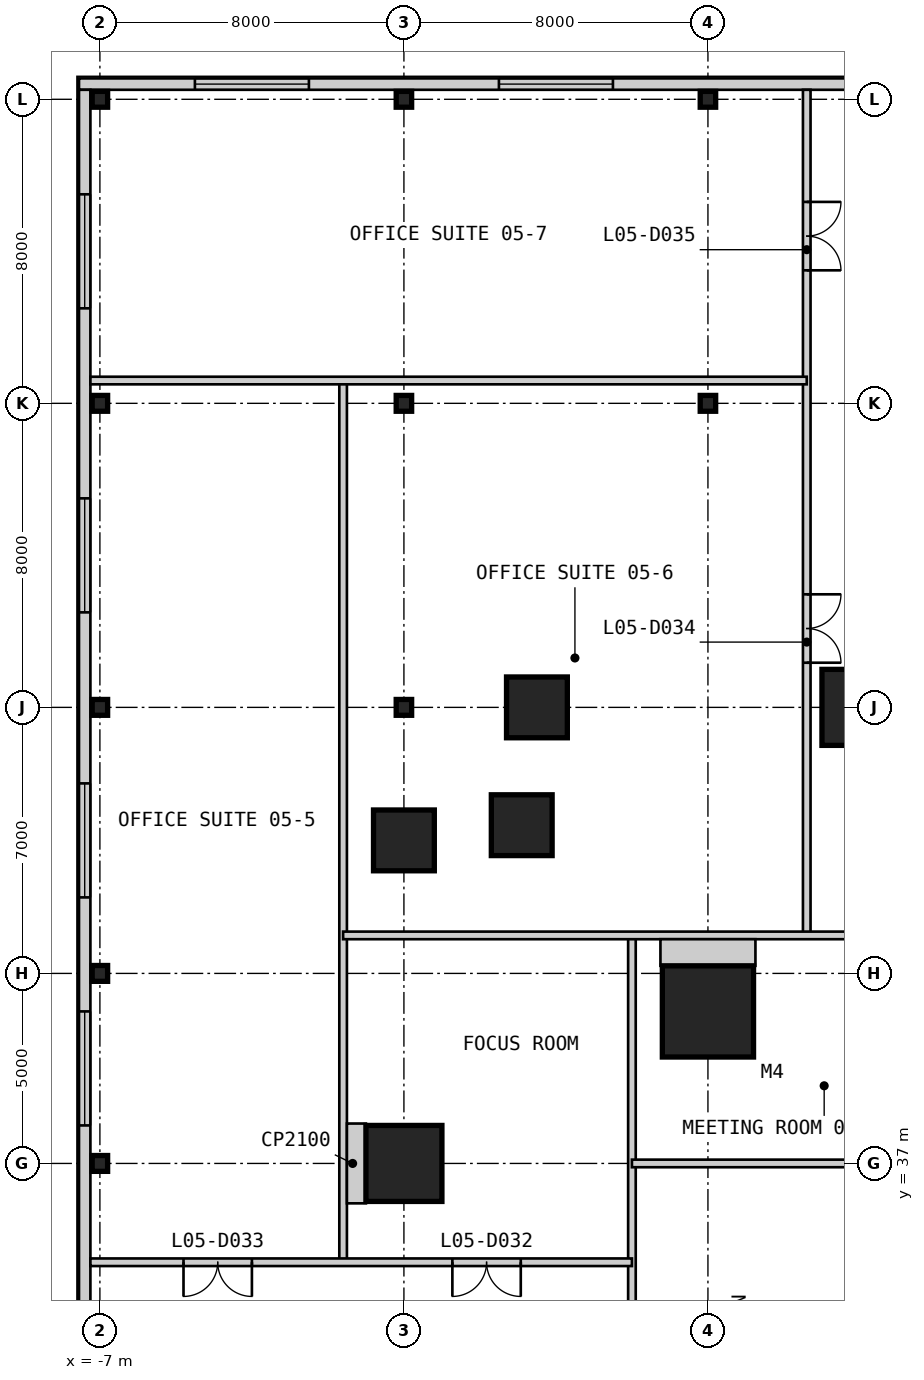
"""IFC4 building model, lengths in metres.
Left out: names, types, materials, properties, quantities, classifications, styles, units other than length and angle.
Written with IfcOpenShell. Run it as: python <this file> out.ifc"""

import sys

from ifc_helpers import new_model, si_unit, direction, frame, frame_2d, origin, origin_2d, place, context, subcontext, project, spatial, rectangle, i_section, extrude, element, fill, save


model = new_model("IFC4")
c1 = context("Model", 3, precision=1e-05, world=origin(), true_north=direction((0.0, 1.0)))
c2 = subcontext(c1, "Body", "Model", "MODEL_VIEW")
j1 = project(units=[si_unit("LENGTHUNIT", "METRE"), si_unit("PLANEANGLEUNIT", "RADIAN")], contexts=[c1])
p1 = place(None, origin())
s1 = spatial("IfcSite", under=j1, at=p1, CompositionType="ELEMENT")
p2 = place(p1, origin())
s2 = spatial("IfcBuilding", under=s1, at=p2, CompositionType="ELEMENT")
p3 = place(p2, frame((0.0, 0.0, 26.2)))
s3 = spatial("IfcBuildingStorey", under=s2, at=p3, CompositionType="ELEMENT", Elevation=26.2)
p4 = place(p3, frame((9.0, 41.0, 0.0), z_axis=(0.0, 0.0, 1.0), x_axis=(1.0, 0.0, 0.0)))
e1 = element("IfcColumn", 1, at=p4, inside=s3, PredefinedType="COLUMN", context=c2, shape_type="SweptSolid", body=[
    extrude(rectangle(XDim=2.4, YDim=2.4, at=origin_2d()), origin(), (0.0, 0.0, 1.0), 4.8),
])
p5 = place(p3, frame((13.0, 49.0, 0.0), z_axis=(0.0, 0.0, 1.0), x_axis=(1.0, 0.0, 0.0)))
e2 = element("IfcColumn", 2, at=p5, inside=s3, PredefinedType="COLUMN", context=c2, shape_type="SweptSolid", body=[
    extrude(rectangle(XDim=2.0, YDim=2.0, at=origin_2d()), origin(), (0.0, 0.0, 1.0), 4.8),
])
for number, where, z_axis, x_axis in (
    (3, (4.5, 49.0, 0.0), (0.0, 0.0, 1.0), (1.0, 0.0, 0.0)),
    (4, (4.1, 45.9, 0.0), (0.0, 0.0, 1.0), (1.0, 0.0, 0.0)),
    (5, (1.0, 45.5, 0.0), (0.0, 0.0, 1.0), (1.0, 0.0, 0.0)),
):
    element("IfcColumn", number, at=place(p3, frame(where, z_axis=z_axis, x_axis=x_axis)), inside=s3, PredefinedType="COLUMN", context=c2, shape_type="SweptSolid", body=[
        extrude(rectangle(XDim=1.6, YDim=1.6, at=origin_2d()), origin(), (0.0, 0.0, 1.0), 4.8),
    ])
p6 = place(p3, frame((1.0, 37.0, 0.0), z_axis=(0.0, 0.0, 1.0), x_axis=(1.0, 0.0, 0.0)))
e6 = element("IfcColumn", 6, at=p6, inside=s3, PredefinedType="COLUMN", context=c2, shape_type="SweptSolid", body=[
    extrude(rectangle(XDim=2.0, YDim=2.0, at=origin_2d()), origin(), (0.0, 0.0, 1.0), 4.8),
])
for number, where, z_axis, x_axis in (
    (7, (-7.0, 37.0, 0.0), (0.0, 0.0, 1.0), (1.0, 0.0, 0.0)),
    (8, (-7.0, 42.0, 0.0), (0.0, 0.0, 1.0), (1.0, 0.0, 0.0)),
    (9, (-7.0, 49.0, 0.0), (0.0, 0.0, 1.0), (1.0, 0.0, 0.0)),
    (10, (-7.0, 57.0, 0.0), (0.0, 0.0, 1.0), (1.0, 0.0, 0.0)),
    (11, (-7.0, 65.0, 0.0), (0.0, 0.0, 1.0), (1.0, 0.0, 0.0)),
    (12, (1.0, 49.0, 0.0), (0.0, 0.0, 1.0), (1.0, 0.0, 0.0)),
    (13, (1.0, 57.0, 0.0), (0.0, 0.0, 1.0), (1.0, 0.0, 0.0)),
    (14, (1.0, 65.0, 0.0), (0.0, 0.0, 1.0), (1.0, 0.0, 0.0)),
    (15, (9.0, 57.0, 0.0), (0.0, 0.0, 1.0), (1.0, 0.0, 0.0)),
    (16, (9.0, 65.0, 0.0), (0.0, 0.0, 1.0), (1.0, 0.0, 0.0)),
):
    element("IfcColumn", number, at=place(p3, frame(where, z_axis=z_axis, x_axis=x_axis)), inside=s3, PredefinedType="COLUMN", context=c2, shape_type="SweptSolid", body=[
        extrude(i_section(OverallWidth=0.406, OverallDepth=0.417, WebThickness=0.03, FlangeThickness=0.048, at=origin_2d()), origin(), (0.0, 0.0, 1.0), 4.8),
    ])
p7 = place(p3, frame((57.55, 65.4, 0.0), z_axis=(0.0, 0.0, 1.0), x_axis=(-1.0, 0.0, 0.0)))
e17 = element("IfcWall", 17, at=p7, inside=s3, PredefinedType="SOLIDWALL", context=c2, shape_type="SweptSolid", body=[
    extrude(rectangle(XDim=65.1, YDim=0.3, at=frame_2d((32.55, 0.0))), origin(), (0.0, 0.0, 1.0), 4.5),
])
p8 = place(p7, frame((59.05, 0.0, 0.9)))
e18 = element("IfcOpeningElement", 18, at=p8, cuts=e17, PredefinedType="OPENING", context=c2, shape_type="SweptSolid", body=[
    extrude(rectangle(XDim=3.0, YDim=2.4, at=frame_2d((1.5, 1.2))), frame((0.0, 0.16, 0.0), z_axis=(0.0, -1.0, 0.0), x_axis=(1.0, 0.0, 0.0)), (0.0, 0.0, 1.0), 0.32),
])
p9 = place(p7, frame((51.05, 0.0, 0.9)))
e19 = element("IfcOpeningElement", 19, at=p9, cuts=e17, PredefinedType="OPENING", context=c2, shape_type="SweptSolid", body=[
    extrude(rectangle(XDim=3.0, YDim=2.4, at=frame_2d((1.5, 1.2))), frame((0.0, 0.16, 0.0), z_axis=(0.0, -1.0, 0.0), x_axis=(1.0, 0.0, 0.0)), (0.0, 0.0, 1.0), 0.32),
])
p10 = place(p7, frame((37.05, 0.0, 0.9)))
e20 = element("IfcOpeningElement", 20, at=p10, cuts=e17, PredefinedType="OPENING", context=c2, shape_type="SweptSolid", body=[
    extrude(rectangle(XDim=3.0, YDim=2.4, at=frame_2d((1.5, 1.2))), frame((0.0, 0.16, 0.0), z_axis=(0.0, -1.0, 0.0), x_axis=(1.0, 0.0, 0.0)), (0.0, 0.0, 1.0), 0.32),
])
p11 = place(p7, frame((25.05, 0.0, 0.9)))
e21 = element("IfcOpeningElement", 21, at=p11, cuts=e17, PredefinedType="OPENING", context=c2, shape_type="SweptSolid", body=[
    extrude(rectangle(XDim=3.0, YDim=2.4, at=frame_2d((1.5, 1.2))), frame((0.0, 0.16, 0.0), z_axis=(0.0, -1.0, 0.0), x_axis=(1.0, 0.0, 0.0)), (0.0, 0.0, 1.0), 0.32),
])
p12 = place(p7, frame((16.55, 0.0, 0.9)))
e22 = element("IfcOpeningElement", 22, at=p12, cuts=e17, PredefinedType="OPENING", context=c2, shape_type="SweptSolid", body=[
    extrude(rectangle(XDim=3.0, YDim=2.4, at=frame_2d((1.5, 1.2))), frame((0.0, 0.16, 0.0), z_axis=(0.0, -1.0, 0.0), x_axis=(1.0, 0.0, 0.0)), (0.0, 0.0, 1.0), 0.32),
])
p13 = place(p7, frame((10.55, 0.0, 0.9)))
e23 = element("IfcOpeningElement", 23, at=p13, cuts=e17, PredefinedType="OPENING", context=c2, shape_type="SweptSolid", body=[
    extrude(rectangle(XDim=3.0, YDim=2.4, at=frame_2d((1.5, 1.2))), frame((0.0, 0.16, 0.0), z_axis=(0.0, -1.0, 0.0), x_axis=(1.0, 0.0, 0.0)), (0.0, 0.0, 1.0), 0.32),
])
p14 = place(p7, frame((3.05, 0.0, 0.9)))
e24 = element("IfcOpeningElement", 24, at=p14, cuts=e17, PredefinedType="OPENING", context=c2, shape_type="SweptSolid", body=[
    extrude(rectangle(XDim=3.0, YDim=2.4, at=frame_2d((1.5, 1.2))), frame((0.0, 0.16, 0.0), z_axis=(0.0, -1.0, 0.0), x_axis=(1.0, 0.0, 0.0)), (0.0, 0.0, 1.0), 0.32),
])
p15 = place(p3, frame((-7.4, 65.25, 0.0), z_axis=(0.0, 0.0, 1.0), x_axis=(0.0, -1.0, 0.0)))
e25 = element("IfcWall", 25, at=p15, inside=s3, PredefinedType="SOLIDWALL", context=c2, shape_type="SweptSolid", body=[
    extrude(rectangle(XDim=72.5, YDim=0.3, at=frame_2d((36.25, 0.0))), origin(), (0.0, 0.0, 1.0), 4.5),
])
p16 = place(p15, frame((66.75, 0.0, 0.9)))
e26 = element("IfcOpeningElement", 26, at=p16, cuts=e25, PredefinedType="OPENING", context=c2, shape_type="SweptSolid", body=[
    extrude(rectangle(XDim=3.0, YDim=2.4, at=frame_2d((1.5, 1.2))), frame((0.0, 0.16, 0.0), z_axis=(0.0, -1.0, 0.0), x_axis=(1.0, 0.0, 0.0)), (0.0, 0.0, 1.0), 0.32),
])
p17 = place(p15, frame((58.75, 0.0, 0.9)))
e27 = element("IfcOpeningElement", 27, at=p17, cuts=e25, PredefinedType="OPENING", context=c2, shape_type="SweptSolid", body=[
    extrude(rectangle(XDim=3.0, YDim=2.4, at=frame_2d((1.5, 1.2))), frame((0.0, 0.16, 0.0), z_axis=(0.0, -1.0, 0.0), x_axis=(1.0, 0.0, 0.0)), (0.0, 0.0, 1.0), 0.32),
])
p18 = place(p15, frame((44.75, 0.0, 0.9)))
e28 = element("IfcOpeningElement", 28, at=p18, cuts=e25, PredefinedType="OPENING", context=c2, shape_type="SweptSolid", body=[
    extrude(rectangle(XDim=3.0, YDim=2.4, at=frame_2d((1.5, 1.2))), frame((0.0, 0.16, 0.0), z_axis=(0.0, -1.0, 0.0), x_axis=(1.0, 0.0, 0.0)), (0.0, 0.0, 1.0), 0.32),
])
p19 = place(p15, frame((32.75, 0.0, 0.9)))
e29 = element("IfcOpeningElement", 29, at=p19, cuts=e25, PredefinedType="OPENING", context=c2, shape_type="SweptSolid", body=[
    extrude(rectangle(XDim=3.0, YDim=2.4, at=frame_2d((1.5, 1.2))), frame((0.0, 0.16, 0.0), z_axis=(0.0, -1.0, 0.0), x_axis=(1.0, 0.0, 0.0)), (0.0, 0.0, 1.0), 0.32),
])
p20 = place(p15, frame((24.25, 0.0, 0.9)))
e30 = element("IfcOpeningElement", 30, at=p20, cuts=e25, PredefinedType="OPENING", context=c2, shape_type="SweptSolid", body=[
    extrude(rectangle(XDim=3.0, YDim=2.4, at=frame_2d((1.5, 1.2))), frame((0.0, 0.16, 0.0), z_axis=(0.0, -1.0, 0.0), x_axis=(1.0, 0.0, 0.0)), (0.0, 0.0, 1.0), 0.32),
])
p21 = place(p15, frame((18.25, 0.0, 0.9)))
e31 = element("IfcOpeningElement", 31, at=p21, cuts=e25, PredefinedType="OPENING", context=c2, shape_type="SweptSolid", body=[
    extrude(rectangle(XDim=3.0, YDim=2.4, at=frame_2d((1.5, 1.2))), frame((0.0, 0.16, 0.0), z_axis=(0.0, -1.0, 0.0), x_axis=(1.0, 0.0, 0.0)), (0.0, 0.0, 1.0), 0.32),
])
p22 = place(p15, frame((10.75, 0.0, 0.9)))
e32 = element("IfcOpeningElement", 32, at=p22, cuts=e25, PredefinedType="OPENING", context=c2, shape_type="SweptSolid", body=[
    extrude(rectangle(XDim=3.0, YDim=2.4, at=frame_2d((1.5, 1.2))), frame((0.0, 0.16, 0.0), z_axis=(0.0, -1.0, 0.0), x_axis=(1.0, 0.0, 0.0)), (0.0, 0.0, 1.0), 0.32),
])
p23 = place(p15, frame((2.75, 0.0, 0.9)))
e33 = element("IfcOpeningElement", 33, at=p23, cuts=e25, PredefinedType="OPENING", context=c2, shape_type="SweptSolid", body=[
    extrude(rectangle(XDim=3.0, YDim=2.4, at=frame_2d((1.5, 1.2))), frame((0.0, 0.16, 0.0), z_axis=(0.0, -1.0, 0.0), x_axis=(1.0, 0.0, 0.0)), (0.0, 0.0, 1.0), 0.32),
])
p24 = place(p3, frame((-0.6, 34.4, 0.0), z_axis=(0.0, 0.0, 1.0), x_axis=(0.0, 1.0, 0.0)))
e34 = element("IfcWall", 34, at=p24, inside=s3, PredefinedType="PARTITIONING", context=c2, shape_type="SweptSolid", body=[
    extrude(rectangle(XDim=23.2, YDim=0.2, at=frame_2d((11.6, 0.0))), origin(), (0.0, 0.0, 1.0), 4.5),
])
p25 = place(p3, frame((7.0, 18.0, 0.0), z_axis=(0.0, 0.0, 1.0), x_axis=(0.0, 1.0, 0.0)))
e35 = element("IfcWall", 35, at=p25, inside=s3, PredefinedType="PARTITIONING", context=c2, shape_type="SweptSolid", body=[
    extrude(rectangle(XDim=25.0, YDim=0.2, at=frame_2d((12.5, 0.0))), origin(), (0.0, 0.0, 1.0), 3.893),
])
p26 = place(p3, frame((11.6, 43.0, 0.0), z_axis=(0.0, 0.0, 1.0), x_axis=(0.0, 1.0, 0.0)))
e36 = element("IfcWall", 36, at=p26, inside=s3, PredefinedType="PARTITIONING", context=c2, shape_type="SweptSolid", body=[
    extrude(rectangle(XDim=22.25, YDim=0.2, at=frame_2d((11.125, 0.0))), origin(), (0.0, 0.0, 1.0), 4.5),
])
p27 = place(p26, frame((7.175, 0.0, 0.0)))
e37 = element("IfcOpeningElement", 37, at=p27, cuts=e36, PredefinedType="OPENING", context=c2, shape_type="SweptSolid", body=[
    extrude(rectangle(XDim=1.8, YDim=2.4, at=frame_2d((0.9, 1.2))), frame((0.0, 0.11, 0.0), z_axis=(0.0, -1.0, 0.0), x_axis=(1.0, 0.0, 0.0)), (0.0, 0.0, 1.0), 0.22),
])
p28 = place(p26, frame((17.5, 0.0, 0.0)))
e38 = element("IfcOpeningElement", 38, at=p28, cuts=e36, PredefinedType="OPENING", context=c2, shape_type="SweptSolid", body=[
    extrude(rectangle(XDim=1.8, YDim=2.4, at=frame_2d((0.9, 1.2))), frame((0.0, 0.11, 0.0), z_axis=(0.0, -1.0, 0.0), x_axis=(1.0, 0.0, 0.0)), (0.0, 0.0, 1.0), 0.22),
])
p29 = place(p3, frame((-7.25, 34.4, 0.0), z_axis=(0.0, 0.0, 1.0), x_axis=(1.0, 0.0, 0.0)))
e39 = element("IfcWall", 39, at=p29, inside=s3, PredefinedType="PARTITIONING", context=c2, shape_type="SweptSolid", body=[
    extrude(rectangle(XDim=14.25, YDim=0.2, at=frame_2d((7.125, 0.0))), origin(), (0.0, 0.0, 1.0), 4.5),
])
p30 = place(p29, frame((9.525, 0.0, 0.0)))
e40 = element("IfcOpeningElement", 40, at=p30, cuts=e39, PredefinedType="OPENING", context=c2, shape_type="SweptSolid", body=[
    extrude(rectangle(XDim=1.8, YDim=2.4, at=frame_2d((0.9, 1.2))), frame((0.0, 0.11, 0.0), z_axis=(0.0, -1.0, 0.0), x_axis=(1.0, 0.0, 0.0)), (0.0, 0.0, 1.0), 0.22),
])
p31 = place(p29, frame((2.45, 0.0, 0.0)))
e41 = element("IfcOpeningElement", 41, at=p31, cuts=e39, PredefinedType="OPENING", context=c2, shape_type="SweptSolid", body=[
    extrude(rectangle(XDim=1.8, YDim=2.4, at=frame_2d((0.9, 1.2))), frame((0.0, 0.11, 0.0), z_axis=(0.0, -1.0, 0.0), x_axis=(1.0, 0.0, 0.0)), (0.0, 0.0, 1.0), 0.22),
])
p32 = place(p3, frame((7.0, 37.0, 0.0), z_axis=(0.0, 0.0, 1.0), x_axis=(1.0, 0.0, 0.0)))
e42 = element("IfcWall", 42, at=p32, inside=s3, PredefinedType="PARTITIONING", context=c2, shape_type="SweptSolid", body=[
    extrude(rectangle(XDim=6.0, YDim=0.2, at=frame_2d((3.0, 0.0))), origin(), (0.0, 0.0, 1.0), 3.703),
])
p33 = place(p3, frame((-0.6, 43.0, 0.0), z_axis=(0.0, 0.0, 1.0), x_axis=(1.0, 0.0, 0.0)))
e43 = element("IfcWall", 43, at=p33, inside=s3, PredefinedType="PARTITIONING", context=c2, shape_type="SweptSolid", body=[
    extrude(rectangle(XDim=14.6, YDim=0.2, at=frame_2d((7.3, 0.0))), origin(), (0.0, 0.0, 1.0), 4.5),
])
p34 = place(p3, frame((-7.25, 57.6, 0.0), z_axis=(0.0, 0.0, 1.0), x_axis=(1.0, 0.0, 0.0)))
e44 = element("IfcWall", 44, at=p34, inside=s3, PredefinedType="PARTITIONING", context=c2, shape_type="SweptSolid", body=[
    extrude(rectangle(XDim=18.85, YDim=0.2, at=frame_2d((9.425, 0.0))), origin(), (0.0, 0.0, 1.0), 4.5),
])
p35 = place(p3, frame((-0.5, 37.0, 0.0), z_axis=(0.0, 0.0, 1.0), x_axis=(1.0, 0.0, 0.0)))
e45 = element("IfcWall", 45, at=p35, inside=s3, PredefinedType="PARTITIONING", context=c2, shape_type="SweptSolid", body=[
    extrude(rectangle(XDim=0.5, YDim=2.1, at=frame_2d((0.25, 0.0))), origin(), (0.0, 0.0, 1.0), 4.5),
])
p36 = place(p3, frame((9.0, 42.9, 0.0), z_axis=(0.0, 0.0, 1.0), x_axis=(0.0, -1.0, 0.0)))
e46 = element("IfcWall", 46, at=p36, inside=s3, PredefinedType="PARTITIONING", context=c2, shape_type="SweptSolid", body=[
    extrude(rectangle(XDim=0.7, YDim=2.5, at=frame_2d((0.35, 0.0))), origin(), (0.0, 0.0, 1.0), 4.5),
])
p37 = place(p8, origin())
e47 = element("IfcWindow", 47, at=p37, inside=s3, PartitioningType="SINGLE_PANEL", PredefinedType="WINDOW", context=c2, shape_type="SweptSolid", body=[
    extrude(rectangle(XDim=3.0, YDim=2.4, at=frame_2d((1.5, 1.2))), frame((0.0, 0.03, 0.0), z_axis=(0.0, -1.0, 0.0), x_axis=(1.0, 0.0, 0.0)), (0.0, 0.0, 1.0), 0.06),
])
fill(e18, e47)
p38 = place(p9, origin())
e48 = element("IfcWindow", 48, at=p38, inside=s3, PartitioningType="SINGLE_PANEL", PredefinedType="WINDOW", context=c2, shape_type="SweptSolid", body=[
    extrude(rectangle(XDim=3.0, YDim=2.4, at=frame_2d((1.5, 1.2))), frame((0.0, 0.03, 0.0), z_axis=(0.0, -1.0, 0.0), x_axis=(1.0, 0.0, 0.0)), (0.0, 0.0, 1.0), 0.06),
])
fill(e19, e48)
p39 = place(p20, origin())
e49 = element("IfcWindow", 49, at=p39, inside=s3, PartitioningType="SINGLE_PANEL", PredefinedType="WINDOW", context=c2, shape_type="SweptSolid", body=[
    extrude(rectangle(XDim=3.0, YDim=2.4, at=frame_2d((1.5, 1.2))), frame((0.0, 0.03, 0.0), z_axis=(0.0, -1.0, 0.0), x_axis=(1.0, 0.0, 0.0)), (0.0, 0.0, 1.0), 0.06),
])
fill(e30, e49)
p40 = place(p21, origin())
e50 = element("IfcWindow", 50, at=p40, inside=s3, PartitioningType="SINGLE_PANEL", PredefinedType="WINDOW", context=c2, shape_type="SweptSolid", body=[
    extrude(rectangle(XDim=3.0, YDim=2.4, at=frame_2d((1.5, 1.2))), frame((0.0, 0.03, 0.0), z_axis=(0.0, -1.0, 0.0), x_axis=(1.0, 0.0, 0.0)), (0.0, 0.0, 1.0), 0.06),
])
fill(e31, e50)
p41 = place(p22, origin())
e51 = element("IfcWindow", 51, at=p41, inside=s3, PartitioningType="SINGLE_PANEL", PredefinedType="WINDOW", context=c2, shape_type="SweptSolid", body=[
    extrude(rectangle(XDim=3.0, YDim=2.4, at=frame_2d((1.5, 1.2))), frame((0.0, 0.03, 0.0), z_axis=(0.0, -1.0, 0.0), x_axis=(1.0, 0.0, 0.0)), (0.0, 0.0, 1.0), 0.06),
])
fill(e32, e51)
p42 = place(p23, origin())
e52 = element("IfcWindow", 52, at=p42, inside=s3, PartitioningType="SINGLE_PANEL", PredefinedType="WINDOW", context=c2, shape_type="SweptSolid", body=[
    extrude(rectangle(XDim=3.0, YDim=2.4, at=frame_2d((1.5, 1.2))), frame((0.0, 0.03, 0.0), z_axis=(0.0, -1.0, 0.0), x_axis=(1.0, 0.0, 0.0)), (0.0, 0.0, 1.0), 0.06),
])
fill(e33, e52)
p43 = place(p30, frame((1.8, 0.0, 0.0), z_axis=(0.0, 0.0, 1.0), x_axis=(-1.0, 0.0, 0.0)))
e53 = element("IfcDoor", 53, at=p43, inside=s3, OperationType="DOUBLE_DOOR_SINGLE_SWING", PredefinedType="DOOR", context=c2, shape_type="SweptSolid", body=[
    extrude(rectangle(XDim=1.8, YDim=2.4, at=frame_2d((0.9, 1.2))), frame((0.0, 0.025, 0.0), z_axis=(0.0, -1.0, 0.0), x_axis=(1.0, 0.0, 0.0)), (0.0, 0.0, 1.0), 0.05),
])
fill(e40, e53)
p44 = place(p31, frame((1.8, 0.0, 0.0), z_axis=(0.0, 0.0, 1.0), x_axis=(-1.0, 0.0, 0.0)))
e54 = element("IfcDoor", 54, at=p44, inside=s3, OperationType="DOUBLE_DOOR_SINGLE_SWING", PredefinedType="DOOR", context=c2, shape_type="SweptSolid", body=[
    extrude(rectangle(XDim=1.8, YDim=2.4, at=frame_2d((0.9, 1.2))), frame((0.0, 0.025, 0.0), z_axis=(0.0, -1.0, 0.0), x_axis=(1.0, 0.0, 0.0)), (0.0, 0.0, 1.0), 0.05),
])
fill(e41, e54)
p45 = place(p27, frame((1.8, 0.0, 0.0), z_axis=(0.0, 0.0, 1.0), x_axis=(-1.0, 0.0, 0.0)))
e55 = element("IfcDoor", 55, at=p45, inside=s3, OperationType="DOUBLE_DOOR_SINGLE_SWING", PredefinedType="DOOR", context=c2, shape_type="SweptSolid", body=[
    extrude(rectangle(XDim=1.8, YDim=2.4, at=frame_2d((0.9, 1.2))), frame((0.0, 0.025, 0.0), z_axis=(0.0, -1.0, 0.0), x_axis=(1.0, 0.0, 0.0)), (0.0, 0.0, 1.0), 0.05),
])
fill(e37, e55)
p46 = place(p28, frame((1.8, 0.0, 0.0), z_axis=(0.0, 0.0, 1.0), x_axis=(-1.0, 0.0, 0.0)))
e56 = element("IfcDoor", 56, at=p46, inside=s3, OperationType="DOUBLE_DOOR_SINGLE_SWING", PredefinedType="DOOR", context=c2, shape_type="SweptSolid", body=[
    extrude(rectangle(XDim=1.8, YDim=2.4, at=frame_2d((0.9, 1.2))), frame((0.0, 0.025, 0.0), z_axis=(0.0, -1.0, 0.0), x_axis=(1.0, 0.0, 0.0)), (0.0, 0.0, 1.0), 0.05),
])
fill(e38, e56)
save(model, sys.argv[1])
